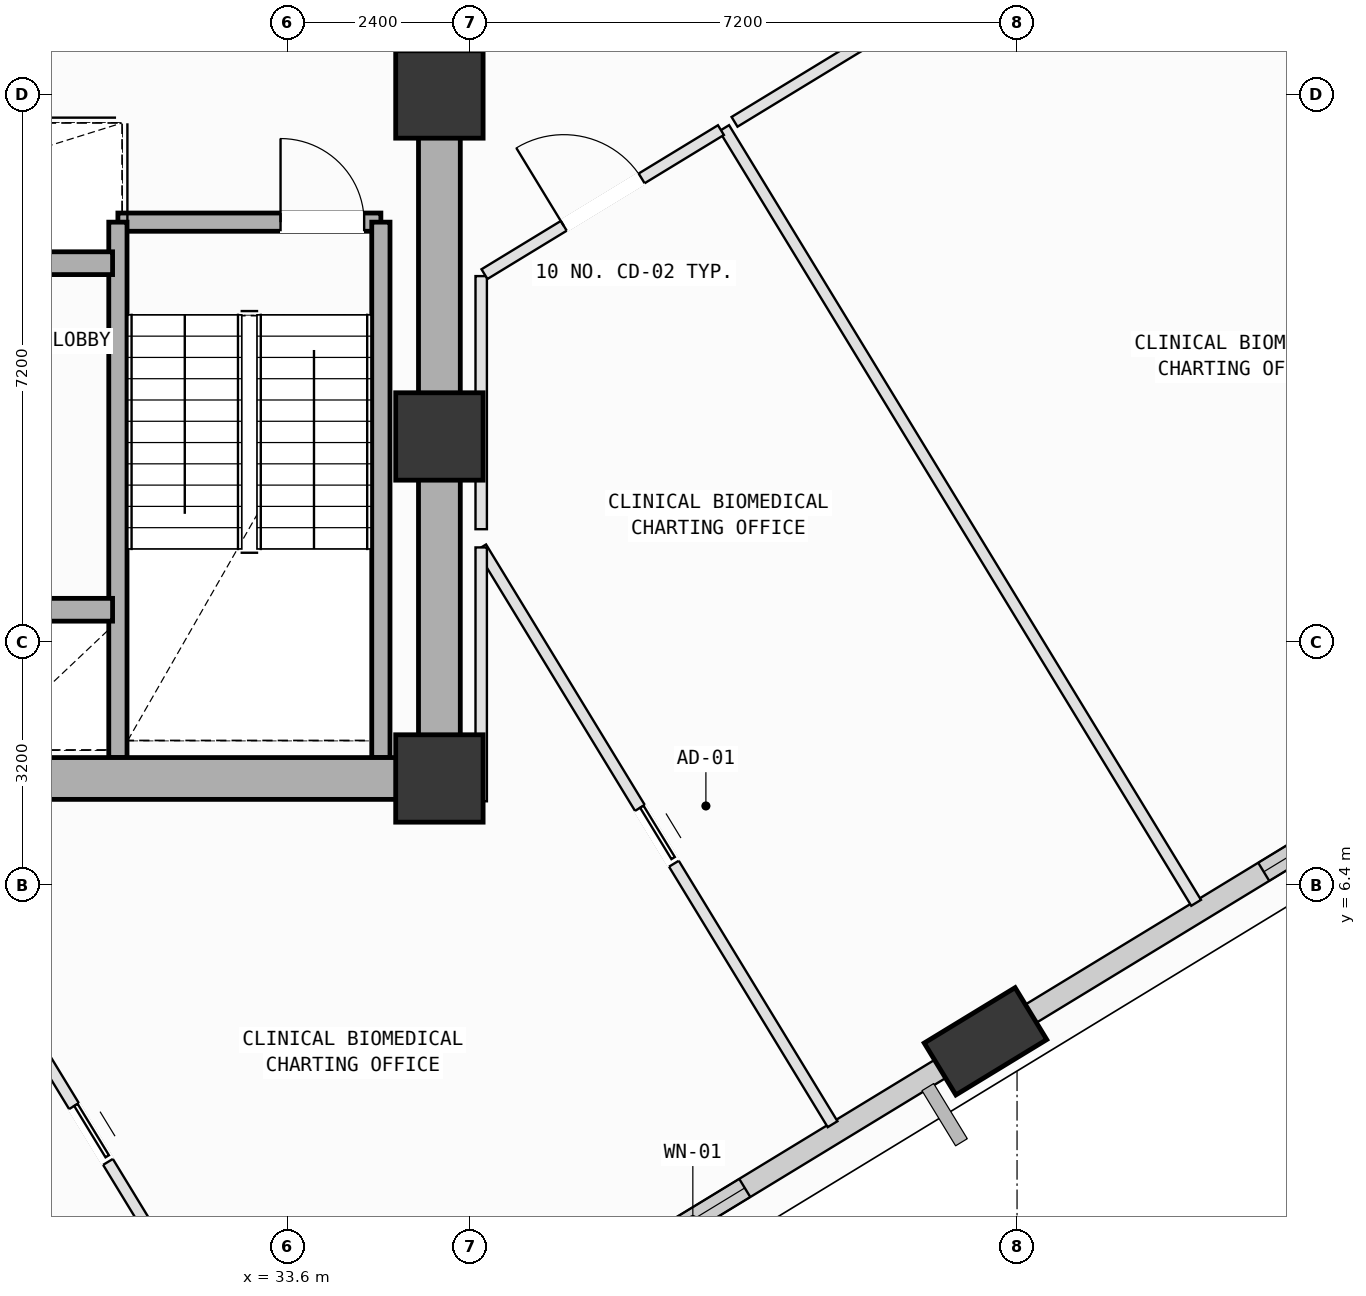
"""IFC4 building model, lengths in metres.
Left out: names, types, materials, properties, quantities, classifications, styles, units other than length and angle.
Written with IfcOpenShell. Run it as: python <this file> out.ifc"""

import sys

from ifc_helpers import new_model, si_unit, direction, frame, frame_2d, origin, origin_2d, place, context, subcontext, project, spatial, rectangle, extrude, element, fill, save


model = new_model("IFC4")
c1 = context("Model", 3, precision=1e-05, world=origin(), true_north=direction((0.0, 1.0)))
c2 = subcontext(c1, "Body", "Model", "MODEL_VIEW")
j1 = project(units=[si_unit("LENGTHUNIT", "METRE"), si_unit("PLANEANGLEUNIT", "RADIAN")], contexts=[c1])
p1 = place(None, origin())
s1 = spatial("IfcSite", under=j1, at=p1, CompositionType="ELEMENT")
p2 = place(p1, origin())
s2 = spatial("IfcBuilding", under=s1, at=p2, CompositionType="ELEMENT")
p3 = place(p2, frame((0.0, 0.0, 157.8)))
s3 = spatial("IfcBuildingStorey", under=s2, at=p3, CompositionType="ELEMENT", Elevation=157.8)
for number, where, z_axis, x_axis in (
    (1, (35.6, 7.8, 0.0), (0.0, 0.0, 1.0), (1.0, 0.0, 0.0)),
    (2, (35.6, 12.3, 0.0), (0.0, 0.0, 1.0), (1.0, 0.0, 0.0)),
    (3, (35.6, 16.8, 0.0), (0.0, 0.0, 1.0), (1.0, 0.0, 0.0)),
):
    element("IfcColumn", number, at=place(p3, frame(where, z_axis=z_axis, x_axis=x_axis)), inside=s3, PredefinedType="COLUMN", context=c2, shape_type="SweptSolid", body=[
        extrude(rectangle(XDim=1.15, YDim=1.15, at=origin_2d()), origin(), (0.0, 0.0, 1.0), 4.0),
    ])
p4 = place(p3, frame((42.785, 4.342, 0.002), z_axis=(0.084126390041, 0.038565532383, 0.995708516691), x_axis=(-0.826791669794, 0.560443862789, 0.048147808071)))
e4 = element("IfcColumn", 4, at=p4, inside=s3, PredefinedType="COLUMN", context=c2, shape_type="SweptSolid", body=[
    extrude(rectangle(XDim=1.4, YDim=0.8, at=origin_2d()), origin(), (0.0, 0.0, 1.0), 4.014),
])
p5 = place(p3, frame((42.519, 4.18, 0.0), z_axis=(0.0, 0.0, 1.0), x_axis=(-0.854020982739, -0.520238561663, 0.0)))
e5 = element("IfcWall", 5, at=p5, inside=s3, PredefinedType="SOLIDWALL", context=c2, shape_type="SweptSolid", body=[
    extrude(rectangle(XDim=6.214, YDim=0.28, at=frame_2d((3.107, 0.0))), origin(), (0.0, 0.0, 1.0), 3.165),
])
p6 = place(p5, frame((3.397, 0.0, 0.75)))
e6 = element("IfcOpeningElement", 6, at=p6, cuts=e5, PredefinedType="OPENING", context=c2, shape_type="SweptSolid", body=[
    extrude(rectangle(XDim=1.6, YDim=1.95, at=frame_2d((0.8, 0.975))), frame((0.0, 0.15, 0.0), z_axis=(0.0, -1.0, 0.0), x_axis=(1.0, 0.0, 0.0)), (0.0, 0.0, 1.0), 0.3),
])
p7 = place(p3, frame((48.668, 7.926, 0.0), z_axis=(0.0, 0.0, 1.0), x_axis=(-0.85401095284, -0.520255026338, 0.0)))
e7 = element("IfcWall", 7, at=p7, inside=s3, PredefinedType="SOLIDWALL", context=c2, shape_type="SweptSolid", body=[
    extrude(rectangle(XDim=6.209, YDim=0.28, at=frame_2d((3.104, 0.0))), origin(), (0.0, 0.0, 1.0), 3.165),
])
p8 = place(p7, frame((0.603, 0.0, 0.75)))
e8 = element("IfcOpeningElement", 8, at=p8, cuts=e7, PredefinedType="OPENING", context=c2, shape_type="SweptSolid", body=[
    extrude(rectangle(XDim=2.0, YDim=1.95, at=frame_2d((1.0, 0.975))), frame((0.0, 0.15, 0.0), z_axis=(0.0, -1.0, 0.0), x_axis=(1.0, 0.0, 0.0)), (0.0, 0.0, 1.0), 0.3),
])
p9 = place(p3, frame((31.37, 15.12, 0.0), z_axis=(0.0, 0.0, 1.0), x_axis=(1.0, 0.0, 0.0)))
e9 = element("IfcWall", 9, at=p9, inside=s3, PredefinedType="SOLIDWALL", context=c2, shape_type="SweptSolid", body=[
    extrude(rectangle(XDim=3.46, YDim=0.24, at=frame_2d((1.73, 0.0))), origin(), (0.0, 0.0, 1.0), 3.78),
])
p10 = place(p9, frame((2.14, 0.0, 0.0)))
e10 = element("IfcOpeningElement", 10, at=p10, cuts=e9, PredefinedType="OPENING", context=c2, shape_type="SweptSolid", body=[
    extrude(rectangle(XDim=1.1, YDim=2.15, at=frame_2d((0.55, 1.075))), frame((0.0, 0.13, 0.0), z_axis=(0.0, -1.0, 0.0), x_axis=(1.0, 0.0, 0.0)), (0.0, 0.0, 1.0), 0.26),
])
for number, where, z_axis, x_axis in (
    (11, (34.83, 15.12, 0.0), (0.0, 0.0, 1.0), (0.0, -1.0, 0.0)),
    (12, (31.37, 8.075, 0.0), (0.0, 0.0, 1.0), (0.0, 1.0, 0.0)),
):
    element("IfcWall", number, at=place(p3, frame(where, z_axis=z_axis, x_axis=x_axis)), inside=s3, PredefinedType="SOLIDWALL", context=c2, shape_type="SweptSolid", body=[
        extrude(rectangle(XDim=7.045, YDim=0.24, at=frame_2d((3.522, 0.0))), origin(), (0.0, 0.0, 1.0), 3.78),
    ])
p11 = place(p3, frame((24.8, 7.8, 0.0), z_axis=(0.0, 0.0, 1.0), x_axis=(1.0, 0.0, 0.0)))
e13 = element("IfcWall", 13, at=p11, inside=s3, PredefinedType="SHEAR", context=c2, shape_type="SweptSolid", body=[
    extrude(rectangle(XDim=10.8, YDim=0.55, at=frame_2d((5.4, 0.0))), origin(), (0.0, 0.0, 1.0), 3.78),
])
p12 = place(p3, frame((35.6, 7.8, 0.0), z_axis=(0.0, 0.0, 1.0), x_axis=(0.0, 1.0, 0.0)))
e14 = element("IfcWall", 14, at=p12, inside=s3, PredefinedType="SHEAR", context=c2, shape_type="SweptSolid", body=[
    extrude(rectangle(XDim=9.0, YDim=0.55, at=frame_2d((4.5, 0.0))), origin(), (0.0, 0.0, 1.0), 3.78),
])
p13 = place(p3, frame((29.6, 10.02, 0.0), z_axis=(0.0, 0.0, 1.0), x_axis=(1.0, 0.0, 0.0)))
e15 = element("IfcWall", 15, at=p13, inside=s3, PredefinedType="SOLIDWALL", context=c2, shape_type="SweptSolid", body=[
    extrude(rectangle(XDim=1.7, YDim=0.3, at=frame_2d((0.85, 0.0))), origin(), (0.0, 0.0, 1.0), 3.78),
])
p14 = place(p3, frame((25.85, 14.58, 0.0), z_axis=(0.0, 0.0, 1.0), x_axis=(1.0, 0.0, 0.0)))
e16 = element("IfcWall", 16, at=p14, inside=s3, PredefinedType="SOLIDWALL", context=c2, shape_type="SweptSolid", body=[
    extrude(rectangle(XDim=5.45, YDim=0.3, at=frame_2d((2.725, 0.0))), origin(), (0.0, 0.0, 1.0), 3.78),
])
p15 = place(p14, frame((0.34, 0.0, 0.0)))
e17 = element("IfcOpeningElement", 17, at=p15, cuts=e16, PredefinedType="OPENING", context=c2, shape_type="SweptSolid", body=[
    extrude(rectangle(XDim=1.12, YDim=2.15, at=frame_2d((0.56, 1.075))), frame((0.0, 0.16, 0.0), z_axis=(0.0, -1.0, 0.0), x_axis=(1.0, 0.0, 0.0)), (0.0, 0.0, 1.0), 0.32),
])
p16 = place(p14, frame((2.24, 0.0, 0.0)))
e18 = element("IfcOpeningElement", 18, at=p16, cuts=e16, PredefinedType="OPENING", context=c2, shape_type="SweptSolid", body=[
    extrude(rectangle(XDim=1.12, YDim=2.15, at=frame_2d((0.56, 1.075))), frame((0.0, 0.16, 0.0), z_axis=(0.0, -1.0, 0.0), x_axis=(1.0, 0.0, 0.0)), (0.0, 0.0, 1.0), 0.32),
])
p17 = place(p3, frame((28.249, 7.663, 0.0), z_axis=(0.0, 0.0, 1.0), x_axis=(0.520338524303, -0.853960081108, 0.0)))
e19 = element("IfcWall", 19, at=p17, inside=s3, PredefinedType="PARTITIONING", context=c2, shape_type="SweptSolid", body=[
    extrude(rectangle(XDim=10.284, YDim=0.15, at=frame_2d((5.142, 0.0))), origin(), (0.0, 0.0, 1.0), 3.78),
])
p18 = place(p17, frame((4.888, 0.0, 0.0)))
e20 = element("IfcOpeningElement", 20, at=p18, cuts=e19, PredefinedType="OPENING", context=c2, shape_type="SweptSolid", body=[
    extrude(rectangle(XDim=0.86, YDim=2.06, at=frame_2d((0.43, 1.03))), frame((0.0, 0.085, 0.0), z_axis=(0.0, -1.0, 0.0), x_axis=(1.0, 0.0, 0.0)), (0.0, 0.0, 1.0), 0.17),
])
p19 = place(p3, frame((36.15, 10.84, 0.0), z_axis=(0.0, 0.0, 1.0), x_axis=(0.52024150956, -0.854019186981, 0.0)))
e21 = element("IfcWall", 21, at=p19, inside=s3, PredefinedType="PARTITIONING", context=c2, shape_type="SweptSolid", body=[
    extrude(rectangle(XDim=8.886, YDim=0.15, at=frame_2d((4.443, 0.0))), origin(), (0.0, 0.0, 1.0), 3.78),
])
p20 = place(p19, frame((4.013, 0.0, 0.0)))
e22 = element("IfcOpeningElement", 22, at=p20, cuts=e21, PredefinedType="OPENING", context=c2, shape_type="SweptSolid", body=[
    extrude(rectangle(XDim=0.86, YDim=2.06, at=frame_2d((0.43, 1.03))), frame((0.0, 0.085, 0.0), z_axis=(0.0, -1.0, 0.0), x_axis=(1.0, 0.0, 0.0)), (0.0, 0.0, 1.0), 0.17),
])
p21 = place(p3, frame((35.6, 7.5, 0.0), z_axis=(0.0, 0.0, 1.0), x_axis=(1.0, 0.0, 0.0)))
e23 = element("IfcWall", 23, at=p21, inside=s3, PredefinedType="PARTITIONING", context=c2, shape_type="SweptSolid", body=[
    extrude(rectangle(XDim=0.55, YDim=0.15, at=frame_2d((0.275, 0.0))), origin(), (0.0, 0.0, 1.0), 3.065),
])
p22 = place(p3, frame((36.15, 7.5, 0.0), z_axis=(0.0, 0.0, 1.0), x_axis=(0.0, 1.0, 0.0)))
e24 = element("IfcWall", 24, at=p22, inside=s3, PredefinedType="PARTITIONING", context=c2, shape_type="SweptSolid", body=[
    extrude(rectangle(XDim=3.34, YDim=0.15, at=frame_2d((1.67, 0.0))), origin(), (0.0, 0.0, 1.0), 3.78),
])
p23 = place(p3, frame((39.347, 16.357, 0.0), z_axis=(0.0, 0.0, 1.0), x_axis=(0.520229856241, -0.854026285705, 0.0)))
e25 = element("IfcWall", 25, at=p23, inside=s3, PredefinedType="PARTITIONING", context=c2, shape_type="SweptSolid", body=[
    extrude(rectangle(XDim=11.935, YDim=0.15, at=frame_2d((5.968, 0.0))), origin(), (0.0, 0.0, 1.0), 3.78),
])
p24 = place(p3, frame((43.485, 4.499, 0.0), z_axis=(0.0, 0.0, 1.0), x_axis=(-0.853732080104, -0.520712526642, 0.0)))
e26 = element("IfcWall", 26, at=p24, inside=s3, PredefinedType="PARTITIONING", context=c2, shape_type="SweptSolid", body=[
    extrude(rectangle(XDim=0.991, YDim=0.15, at=frame_2d((0.496, 0.0))), origin(), (0.0, 0.0, 1.0), 3.165),
])
p25 = place(p3, frame((36.15, 11.08, 0.0), z_axis=(0.0, 0.0, 1.0), x_axis=(0.0, 1.0, 0.0)))
e27 = element("IfcWall", 27, at=p25, inside=s3, PredefinedType="PARTITIONING", context=c2, shape_type="SweptSolid", body=[
    extrude(rectangle(XDim=3.33, YDim=0.15, at=frame_2d((1.665, 0.0))), origin(), (0.0, 0.0, 1.0), 3.78),
])
p26 = place(p3, frame((36.193, 14.436, 0.0), z_axis=(0.0, 0.0, 1.0), x_axis=(0.854019897794, 0.520240342699, 0.0)))
e28 = element("IfcWall", 28, at=p26, inside=s3, PredefinedType="PARTITIONING", context=c2, shape_type="SweptSolid", body=[
    extrude(rectangle(XDim=3.643, YDim=0.15, at=frame_2d((1.821, 0.0))), origin(), (0.0, 0.0, 1.0), 3.78),
])
p27 = place(p26, frame((1.221, 0.0, 0.0)))
e29 = element("IfcOpeningElement", 29, at=p27, cuts=e28, PredefinedType="OPENING", context=c2, shape_type="SweptSolid", body=[
    extrude(rectangle(XDim=1.2, YDim=2.15, at=frame_2d((0.6, 1.075))), frame((0.0, 0.085, 0.0), z_axis=(0.0, -1.0, 0.0), x_axis=(1.0, 0.0, 0.0)), (0.0, 0.0, 1.0), 0.17),
])
p28 = place(p3, frame((39.483, 16.44, 0.0), z_axis=(0.0, 0.0, 1.0), x_axis=(0.854001681797, 0.520270244669, 0.0)))
e30 = element("IfcWall", 30, at=p28, inside=s3, PredefinedType="PARTITIONING", context=c2, shape_type="SweptSolid", body=[
    extrude(rectangle(XDim=8.24, YDim=0.15, at=frame_2d((4.12, 0.0))), origin(), (0.0, 0.0, 1.0), 3.78),
])
p29 = place(p28, frame((3.52, 0.0, 0.0)))
e31 = element("IfcOpeningElement", 31, at=p29, cuts=e30, PredefinedType="OPENING", context=c2, shape_type="SweptSolid", body=[
    extrude(rectangle(XDim=1.2, YDim=2.15, at=frame_2d((0.6, 1.075))), frame((0.0, 0.085, 0.0), z_axis=(0.0, -1.0, 0.0), x_axis=(1.0, 0.0, 0.0)), (0.0, 0.0, 1.0), 0.17),
])
p30 = place(p3, frame((46.52, 20.727, 0.0), z_axis=(0.0, 0.0, 1.0), x_axis=(0.520257122218, -0.854009676047, 0.0)))
e32 = element("IfcWall", 32, at=p30, inside=s3, PredefinedType="PARTITIONING", context=c2, shape_type="SweptSolid", body=[
    extrude(rectangle(XDim=11.935, YDim=0.15, at=frame_2d((5.967, 0.0))), origin(), (0.0, 0.0, 1.0), 3.415),
])
p31 = place(p6, origin())
e33 = element("IfcWindow", 33, at=p31, inside=s3, PartitioningType="SINGLE_PANEL", PredefinedType="WINDOW", context=c2, shape_type="SweptSolid", body=[
    extrude(rectangle(XDim=1.6, YDim=1.95, at=frame_2d((0.8, 0.975))), frame((0.0, 0.03, 0.0), z_axis=(0.0, -1.0, 0.0), x_axis=(1.0, 0.0, 0.0)), (0.0, 0.0, 1.0), 0.06),
])
fill(e6, e33)
p32 = place(p8, origin())
e34 = element("IfcWindow", 34, at=p32, inside=s3, PartitioningType="SINGLE_PANEL", PredefinedType="WINDOW", context=c2, shape_type="SweptSolid", body=[
    extrude(rectangle(XDim=2.0, YDim=1.95, at=frame_2d((1.0, 0.975))), frame((0.0, 0.03, 0.0), z_axis=(0.0, -1.0, 0.0), x_axis=(1.0, 0.0, 0.0)), (0.0, 0.0, 1.0), 0.06),
])
fill(e8, e34)
p33 = place(p10, origin())
e35 = element("IfcDoor", 35, at=p33, inside=s3, OperationType="SINGLE_SWING_LEFT", PredefinedType="DOOR", context=c2, shape_type="SweptSolid", body=[
    extrude(rectangle(XDim=1.1, YDim=2.15, at=frame_2d((0.55, 1.075))), frame((0.0, 0.025, 0.0), z_axis=(0.0, -1.0, 0.0), x_axis=(1.0, 0.0, 0.0)), (0.0, 0.0, 1.0), 0.05),
])
fill(e10, e35)
p34 = place(p27, origin())
e36 = element("IfcDoor", 36, at=p34, inside=s3, OperationType="SINGLE_SWING_LEFT", PredefinedType="DOOR", context=c2, shape_type="SweptSolid", body=[
    extrude(rectangle(XDim=1.2, YDim=2.15, at=frame_2d((0.6, 1.075))), frame((0.0, 0.025, 0.0), z_axis=(0.0, -1.0, 0.0), x_axis=(1.0, 0.0, 0.0)), (0.0, 0.0, 1.0), 0.05),
])
fill(e29, e36)
p35 = place(p20, origin())
e37 = element("IfcDoor", 37, at=p35, inside=s3, OperationType="SLIDING_TO_LEFT", PredefinedType="DOOR", context=c2, shape_type="SweptSolid", body=[
    extrude(rectangle(XDim=0.86, YDim=2.06, at=frame_2d((0.43, 1.03))), frame((0.0, 0.025, 0.0), z_axis=(0.0, -1.0, 0.0), x_axis=(1.0, 0.0, 0.0)), (0.0, 0.0, 1.0), 0.05),
])
fill(e22, e37)
p36 = place(p18, origin())
e38 = element("IfcDoor", 38, at=p36, inside=s3, OperationType="SLIDING_TO_LEFT", PredefinedType="DOOR", context=c2, shape_type="SweptSolid", body=[
    extrude(rectangle(XDim=0.86, YDim=2.06, at=frame_2d((0.43, 1.03))), frame((0.0, 0.025, 0.0), z_axis=(0.0, -1.0, 0.0), x_axis=(1.0, 0.0, 0.0)), (0.0, 0.0, 1.0), 0.05),
])
fill(e20, e38)
save(model, sys.argv[1])
